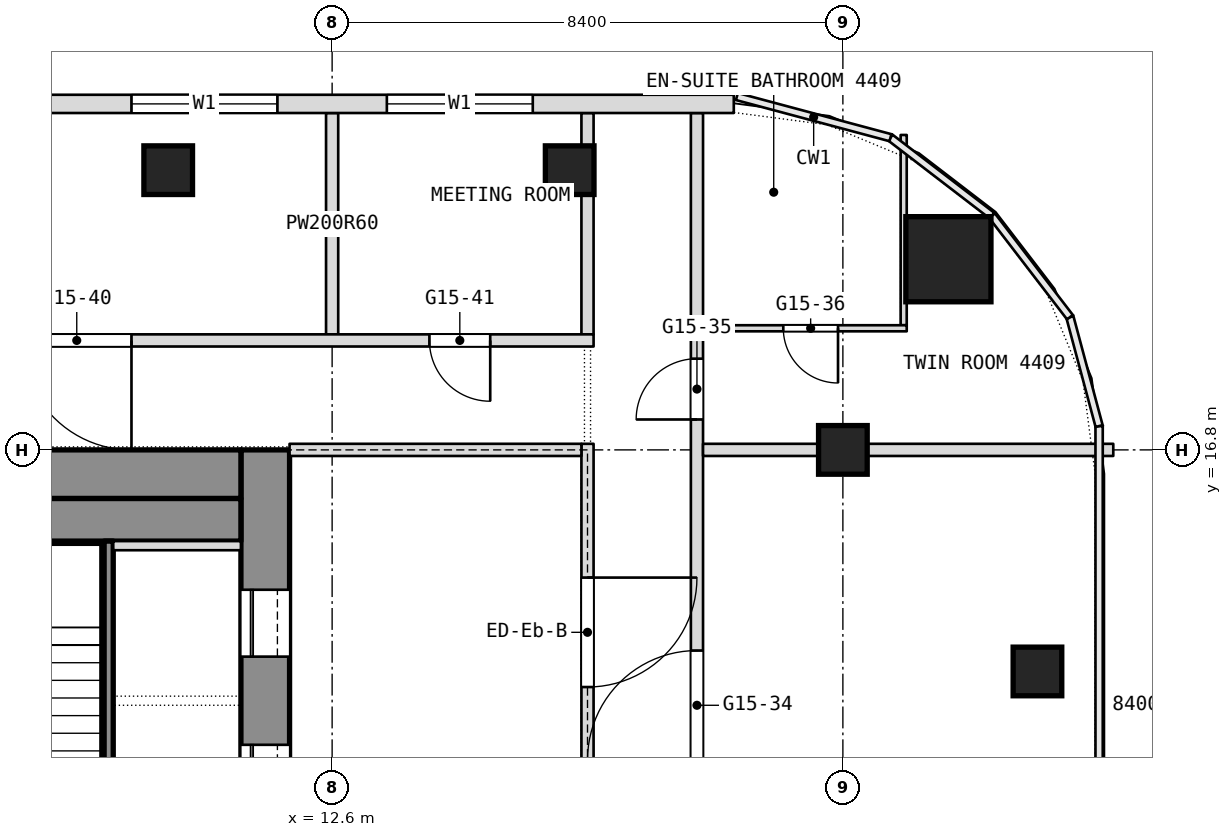
"""IFC4 building model, lengths in metres.
Left out: names, types, materials, properties, quantities, classifications, styles, units other than length and angle.
Written with IfcOpenShell. Run it as: python <this file> out.ifc"""

import sys

from ifc_helpers import new_model, si_unit, direction, frame, frame_2d, origin, origin_2d, place, context, subcontext, project, spatial, rectangle, extrude, element, fill, save


model = new_model("IFC4")
c1 = context("Model", 3, precision=1e-05, world=origin(), true_north=direction((0.0, 1.0)))
c2 = subcontext(c1, "Body", "Model", "MODEL_VIEW")
j1 = project(units=[si_unit("LENGTHUNIT", "METRE"), si_unit("PLANEANGLEUNIT", "RADIAN")], contexts=[c1])
p1 = place(None, origin())
s1 = spatial("IfcSite", under=j1, at=p1, CompositionType="ELEMENT")
p2 = place(p1, origin())
s2 = spatial("IfcBuilding", under=s1, at=p2, CompositionType="ELEMENT")
p3 = place(p2, frame((0.0, 0.0, 194.9)))
s3 = spatial("IfcBuildingStorey", under=s2, at=p3, CompositionType="ELEMENT", Elevation=194.9)
p4 = place(p3, frame((11.5, 0.0, 0.0), z_axis=(0.0, 0.0, 1.0), x_axis=(0.0, 1.0, 0.0)))
e1 = element("IfcWall", 1, at=p4, inside=s3, PredefinedType="SHEAR", context=c2, shape_type="SweptSolid", body=[
    extrude(rectangle(XDim=16.8, YDim=0.8, at=frame_2d((8.4, 0.0))), origin(), (0.0, 0.0, 1.0), 3.6),
])
p5 = place(p4, frame((2.3, 0.0, 0.0)))
e2 = element("IfcOpeningElement", 2, at=p5, cuts=e1, PredefinedType="OPENING", context=c2, shape_type="SweptSolid", body=[
    extrude(rectangle(XDim=1.1, YDim=2.1, at=frame_2d((0.55, 1.05))), frame((0.0, 0.4, 0.0), z_axis=(0.0, -1.0, 0.0), x_axis=(1.0, 0.0, 0.0)), (0.0, 0.0, 1.0), 0.8),
])
p6 = place(p4, frame((4.85, 0.0, 0.0)))
e3 = element("IfcOpeningElement", 3, at=p6, cuts=e1, PredefinedType="OPENING", context=c2, shape_type="SweptSolid", body=[
    extrude(rectangle(XDim=1.1, YDim=2.1, at=frame_2d((0.55, 1.05))), frame((0.0, 0.4, 0.0), z_axis=(0.0, -1.0, 0.0), x_axis=(1.0, 0.0, 0.0)), (0.0, 0.0, 1.0), 0.8),
])
p7 = place(p4, frame((6.825, 0.0, 0.0)))
e4 = element("IfcOpeningElement", 4, at=p7, cuts=e1, PredefinedType="OPENING", context=c2, shape_type="SweptSolid", body=[
    extrude(rectangle(XDim=1.2, YDim=2.1, at=frame_2d((0.6, 1.05))), frame((0.0, 0.4, 0.0), z_axis=(0.0, -1.0, 0.0), x_axis=(1.0, 0.0, 0.0)), (0.0, 0.0, 1.0), 0.8),
])
p8 = place(p4, frame((13.4, 0.0, 0.0)))
e5 = element("IfcOpeningElement", 5, at=p8, cuts=e1, PredefinedType="OPENING", context=c2, shape_type="SweptSolid", body=[
    extrude(rectangle(XDim=1.1, YDim=2.1, at=frame_2d((0.55, 1.05))), frame((0.0, 0.4, 0.0), z_axis=(0.0, -1.0, 0.0), x_axis=(1.0, 0.0, 0.0)), (0.0, 0.0, 1.0), 0.8),
])
p9 = place(p4, frame((10.85, 0.0, 0.0)))
e6 = element("IfcOpeningElement", 6, at=p9, cuts=e1, PredefinedType="OPENING", context=c2, shape_type="SweptSolid", body=[
    extrude(rectangle(XDim=1.1, YDim=2.1, at=frame_2d((0.55, 1.05))), frame((0.0, 0.4, 0.0), z_axis=(0.0, -1.0, 0.0), x_axis=(1.0, 0.0, 0.0)), (0.0, 0.0, 1.0), 0.8),
])
p10 = place(p4, frame((8.775, 0.0, 0.0)))
e7 = element("IfcOpeningElement", 7, at=p10, cuts=e1, PredefinedType="OPENING", context=c2, shape_type="SweptSolid", body=[
    extrude(rectangle(XDim=1.2, YDim=2.1, at=frame_2d((0.6, 1.05))), frame((0.0, 0.4, 0.0), z_axis=(0.0, -1.0, 0.0), x_axis=(1.0, 0.0, 0.0)), (0.0, 0.0, 1.0), 0.8),
])
p11 = place(p3, frame((-11.1, 16.4, 0.0), z_axis=(0.0, 0.0, 1.0), x_axis=(1.0, 0.0, 0.0)))
e8 = element("IfcWall", 8, at=p11, inside=s3, PredefinedType="SHEAR", context=c2, shape_type="SweptSolid", body=[
    extrude(rectangle(XDim=22.2, YDim=0.8, at=frame_2d((11.1, 0.0))), origin(), (0.0, 0.0, 1.0), 3.6),
])
p12 = place(p3, frame((22.736, 19.936, 0.0), z_axis=(0.0, 0.0, 1.0), x_axis=(1.0, 0.0, 0.0)))
e9 = element("IfcColumn", 9, at=p12, inside=s3, PredefinedType="COLUMN", context=c2, shape_type="SweptSolid", body=[
    extrude(rectangle(XDim=1.4, YDim=1.4, at=origin_2d()), origin(), (0.0, 0.0, 1.0), 3.6),
])
for number, where, z_axis, x_axis in (
    (10, (21.0, 16.8, 0.0), (0.0, 0.0, 1.0), (1.0, 0.0, 0.0)),
    (11, (9.904, 21.4, 0.0), (0.0, 0.0, 1.0), (1.0, 0.0, 0.0)),
    (12, (16.507, 21.4, 0.0), (0.0, 0.0, 1.0), (1.0, 0.0, 0.0)),
    (13, (24.2, 13.156, 0.0), (0.0, 0.0, 1.0), (1.0, 0.0, 0.0)),
):
    element("IfcColumn", number, at=place(p3, frame(where, z_axis=z_axis, x_axis=x_axis)), inside=s3, PredefinedType="COLUMN", context=c2, shape_type="SweptSolid", body=[
        extrude(rectangle(XDim=0.8, YDim=0.8, at=origin_2d()), origin(), (0.0, 0.0, 1.0), 3.6),
    ])
p13 = place(p3, frame((22.0, 18.85, 0.0), z_axis=(0.0, 0.0, 1.0), x_axis=(0.0, 1.0, 0.0)))
e14 = element("IfcWall", 14, at=p13, inside=s3, PredefinedType="PARTITIONING", context=c2, shape_type="SweptSolid", body=[
    extrude(rectangle(XDim=3.129, YDim=0.1, at=frame_2d((1.564, 0.0))), origin(), (0.0, 0.0, 1.0), 3.34),
])
p14 = place(p3, frame((18.6, -26.751, 0.0), z_axis=(0.0, 0.0, 1.0), x_axis=(0.0, 1.0, 0.0)))
e15 = element("IfcWall", 15, at=p14, inside=s3, PredefinedType="PARTITIONING", context=c2, shape_type="SweptSolid", body=[
    extrude(rectangle(XDim=49.091, YDim=0.2, at=frame_2d((24.545, 0.0))), origin(), (0.0, 0.0, 1.0), 3.34),
])
p15 = place(p14, frame((3.413, 0.0, 0.0)))
e16 = element("IfcOpeningElement", 16, at=p15, cuts=e15, PredefinedType="OPENING", context=c2, shape_type="SweptSolid", body=[
    extrude(rectangle(XDim=1.0, YDim=2.1, at=frame_2d((0.5, 1.05))), frame((0.0, 0.1, 0.0), z_axis=(0.0, -1.0, 0.0), x_axis=(1.0, 0.0, 0.0)), (0.0, 0.0, 1.0), 0.2),
])
p16 = place(p14, frame((5.838, 0.0, 0.0)))
e17 = element("IfcOpeningElement", 17, at=p16, cuts=e15, PredefinedType="OPENING", context=c2, shape_type="SweptSolid", body=[
    extrude(rectangle(XDim=1.0, YDim=2.1, at=frame_2d((0.5, 1.05))), frame((0.0, 0.1, 0.0), z_axis=(0.0, -1.0, 0.0), x_axis=(1.0, 0.0, 0.0)), (0.0, 0.0, 1.0), 0.2),
])
p17 = place(p14, frame((10.351, 0.0, 0.0)))
e18 = element("IfcOpeningElement", 18, at=p17, cuts=e15, PredefinedType="OPENING", context=c2, shape_type="SweptSolid", body=[
    extrude(rectangle(XDim=1.0, YDim=2.1, at=frame_2d((0.5, 1.05))), frame((0.0, 0.1, 0.0), z_axis=(0.0, -1.0, 0.0), x_axis=(1.0, 0.0, 0.0)), (0.0, 0.0, 1.0), 0.2),
])
p18 = place(p14, frame((16.951, 0.0, 0.0)))
e19 = element("IfcOpeningElement", 19, at=p18, cuts=e15, PredefinedType="OPENING", context=c2, shape_type="SweptSolid", body=[
    extrude(rectangle(XDim=1.0, YDim=2.1, at=frame_2d((0.5, 1.05))), frame((0.0, 0.1, 0.0), z_axis=(0.0, -1.0, 0.0), x_axis=(1.0, 0.0, 0.0)), (0.0, 0.0, 1.0), 0.2),
])
p19 = place(p14, frame((21.151, 0.0, 0.0)))
e20 = element("IfcOpeningElement", 20, at=p19, cuts=e15, PredefinedType="OPENING", context=c2, shape_type="SweptSolid", body=[
    extrude(rectangle(XDim=1.0, YDim=2.1, at=frame_2d((0.5, 1.05))), frame((0.0, 0.1, 0.0), z_axis=(0.0, -1.0, 0.0), x_axis=(1.0, 0.0, 0.0)), (0.0, 0.0, 1.0), 0.2),
])
p20 = place(p14, frame((22.951, 0.0, 0.0)))
e21 = element("IfcOpeningElement", 21, at=p20, cuts=e15, PredefinedType="OPENING", context=c2, shape_type="SweptSolid", body=[
    extrude(rectangle(XDim=1.0, YDim=2.1, at=frame_2d((0.5, 1.05))), frame((0.0, 0.1, 0.0), z_axis=(0.0, -1.0, 0.0), x_axis=(1.0, 0.0, 0.0)), (0.0, 0.0, 1.0), 0.2),
])
p21 = place(p14, frame((27.151, 0.0, 0.0)))
e22 = element("IfcOpeningElement", 22, at=p21, cuts=e15, PredefinedType="OPENING", context=c2, shape_type="SweptSolid", body=[
    extrude(rectangle(XDim=1.0, YDim=2.1, at=frame_2d((0.5, 1.05))), frame((0.0, 0.1, 0.0), z_axis=(0.0, -1.0, 0.0), x_axis=(1.0, 0.0, 0.0)), (0.0, 0.0, 1.0), 0.2),
])
p22 = place(p14, frame((33.751, 0.0, 0.0)))
e23 = element("IfcOpeningElement", 23, at=p22, cuts=e15, PredefinedType="OPENING", context=c2, shape_type="SweptSolid", body=[
    extrude(rectangle(XDim=1.0, YDim=2.1, at=frame_2d((0.5, 1.05))), frame((0.0, 0.1, 0.0), z_axis=(0.0, -1.0, 0.0), x_axis=(1.0, 0.0, 0.0)), (0.0, 0.0, 1.0), 0.2),
])
p23 = place(p14, frame((38.451, 0.0, 0.0)))
e24 = element("IfcOpeningElement", 24, at=p23, cuts=e15, PredefinedType="OPENING", context=c2, shape_type="SweptSolid", body=[
    extrude(rectangle(XDim=1.8, YDim=2.1, at=frame_2d((0.9, 1.05))), frame((0.0, 0.1, 0.0), z_axis=(0.0, -1.0, 0.0), x_axis=(1.0, 0.0, 0.0)), (0.0, 0.0, 1.0), 0.2),
])
p24 = place(p14, frame((44.051, 0.0, 0.0)))
e25 = element("IfcOpeningElement", 25, at=p24, cuts=e15, PredefinedType="OPENING", context=c2, shape_type="SweptSolid", body=[
    extrude(rectangle(XDim=1.0, YDim=2.1, at=frame_2d((0.5, 1.05))), frame((0.0, 0.1, 0.0), z_axis=(0.0, -1.0, 0.0), x_axis=(1.0, 0.0, 0.0)), (0.0, 0.0, 1.0), 0.2),
])
for number, where, z_axis, x_axis in (
    (26, (16.8, 18.7, 0.0), (0.0, 0.0, 1.0), (0.0, 1.0, 0.0)),
    (27, (12.6, 18.7, 0.0), (0.0, 0.0, 1.0), (0.0, 1.0, 0.0)),
):
    element("IfcWall", number, at=place(p3, frame(where, z_axis=z_axis, x_axis=x_axis)), inside=s3, PredefinedType="PARTITIONING", context=c2, shape_type="SweptSolid", body=[
        extrude(rectangle(XDim=3.64, YDim=0.2, at=frame_2d((1.82, 0.0))), origin(), (0.0, 0.0, 1.0), 3.34),
    ])
p25 = place(p3, frame((18.7, 16.8, 0.0), z_axis=(0.0, 0.0, 1.0), x_axis=(1.0, 0.0, 0.0)))
e28 = element("IfcWall", 28, at=p25, inside=s3, PredefinedType="PARTITIONING", context=c2, shape_type="SweptSolid", body=[
    extrude(rectangle(XDim=6.747, YDim=0.2, at=frame_2d((3.374, 0.0))), origin(), (0.0, 0.0, 1.0), 2.94),
])
p26 = place(p3, frame((-16.9, 18.6, 0.0), z_axis=(0.0, 0.0, 1.0), x_axis=(1.0, 0.0, 0.0)))
e29 = element("IfcWall", 29, at=p26, inside=s3, PredefinedType="PARTITIONING", context=c2, shape_type="SweptSolid", body=[
    extrude(rectangle(XDim=33.8, YDim=0.2, at=frame_2d((16.9, 0.0))), origin(), (0.0, 0.0, 1.0), 3.34),
])
p27 = place(p26, frame((1.7, 0.0, 0.0)))
e30 = element("IfcOpeningElement", 30, at=p27, cuts=e29, PredefinedType="OPENING", context=c2, shape_type="SweptSolid", body=[
    extrude(rectangle(XDim=1.0, YDim=2.1, at=frame_2d((0.5, 1.05))), frame((0.0, 0.1, 0.0), z_axis=(0.0, -1.0, 0.0), x_axis=(1.0, 0.0, 0.0)), (0.0, 0.0, 1.0), 0.2),
])
p28 = place(p26, frame((7.6, 0.0, 0.0)))
e31 = element("IfcOpeningElement", 31, at=p28, cuts=e29, PredefinedType="OPENING", context=c2, shape_type="SweptSolid", body=[
    extrude(rectangle(XDim=1.8, YDim=2.1, at=frame_2d((0.9, 1.05))), frame((0.0, 0.1, 0.0), z_axis=(0.0, -1.0, 0.0), x_axis=(1.0, 0.0, 0.0)), (0.0, 0.0, 1.0), 0.2),
])
p29 = place(p26, frame((16.0, 0.0, 0.0)))
e32 = element("IfcOpeningElement", 32, at=p29, cuts=e29, PredefinedType="OPENING", context=c2, shape_type="SweptSolid", body=[
    extrude(rectangle(XDim=1.8, YDim=2.1, at=frame_2d((0.9, 1.05))), frame((0.0, 0.1, 0.0), z_axis=(0.0, -1.0, 0.0), x_axis=(1.0, 0.0, 0.0)), (0.0, 0.0, 1.0), 0.2),
])
p30 = place(p26, frame((24.4, 0.0, 0.0)))
e33 = element("IfcOpeningElement", 33, at=p30, cuts=e29, PredefinedType="OPENING", context=c2, shape_type="SweptSolid", body=[
    extrude(rectangle(XDim=1.8, YDim=2.1, at=frame_2d((0.9, 1.05))), frame((0.0, 0.1, 0.0), z_axis=(0.0, -1.0, 0.0), x_axis=(1.0, 0.0, 0.0)), (0.0, 0.0, 1.0), 0.2),
])
p31 = place(p26, frame((31.1, 0.0, 0.0)))
e34 = element("IfcOpeningElement", 34, at=p31, cuts=e29, PredefinedType="OPENING", context=c2, shape_type="SweptSolid", body=[
    extrude(rectangle(XDim=1.0, YDim=2.1, at=frame_2d((0.5, 1.05))), frame((0.0, 0.1, 0.0), z_axis=(0.0, -1.0, 0.0), x_axis=(1.0, 0.0, 0.0)), (0.0, 0.0, 1.0), 0.2),
])
p32 = place(p3, frame((18.7, 18.8, 0.0), z_axis=(0.0, 0.0, 1.0), x_axis=(1.0, 0.0, 0.0)))
e35 = element("IfcWall", 35, at=p32, inside=s3, PredefinedType="PARTITIONING", context=c2, shape_type="SweptSolid", body=[
    extrude(rectangle(XDim=3.35, YDim=0.1, at=frame_2d((1.675, 0.0))), origin(), (0.0, 0.0, 1.0), 3.34),
])
p33 = place(p32, frame((1.32, 0.0, 0.0)))
e36 = element("IfcOpeningElement", 36, at=p33, cuts=e35, PredefinedType="OPENING", context=c2, shape_type="SweptSolid", body=[
    extrude(rectangle(XDim=0.9, YDim=2.1, at=frame_2d((0.45, 1.05))), frame((0.0, 0.05, 0.0), z_axis=(0.0, -1.0, 0.0), x_axis=(1.0, 0.0, 0.0)), (0.0, 0.0, 1.0), 0.1),
])
p34 = place(p3, frame((19.206, 22.49, 0.0), z_axis=(0.0, 0.0, 1.0), x_axis=(-1.0, 0.0, 0.0)))
e37 = element("IfcWall", 37, at=p34, inside=s3, PredefinedType="NOTDEFINED", context=c2, shape_type="SweptSolid", body=[
    extrude(rectangle(XDim=38.412, YDim=0.3, at=frame_2d((19.206, 0.0))), origin(), (0.0, 0.0, 1.0), 3.6),
])
p35 = place(p34, frame((3.306, 0.0, 0.9)))
e38 = element("IfcOpeningElement", 38, at=p35, cuts=e37, PredefinedType="OPENING", context=c2, shape_type="SweptSolid", body=[
    extrude(rectangle(XDim=2.4, YDim=2.1, at=frame_2d((1.2, 1.05))), frame((0.0, 0.15, 0.0), z_axis=(0.0, -1.0, 0.0), x_axis=(1.0, 0.0, 0.0)), (0.0, 0.0, 1.0), 0.3),
])
p36 = place(p34, frame((7.506, 0.0, 0.9)))
e39 = element("IfcOpeningElement", 39, at=p36, cuts=e37, PredefinedType="OPENING", context=c2, shape_type="SweptSolid", body=[
    extrude(rectangle(XDim=2.4, YDim=2.1, at=frame_2d((1.2, 1.05))), frame((0.0, 0.15, 0.0), z_axis=(0.0, -1.0, 0.0), x_axis=(1.0, 0.0, 0.0)), (0.0, 0.0, 1.0), 0.3),
])
p37 = place(p34, frame((11.706, 0.0, 0.9)))
e40 = element("IfcOpeningElement", 40, at=p37, cuts=e37, PredefinedType="OPENING", context=c2, shape_type="SweptSolid", body=[
    extrude(rectangle(XDim=2.4, YDim=2.1, at=frame_2d((1.2, 1.05))), frame((0.0, 0.15, 0.0), z_axis=(0.0, -1.0, 0.0), x_axis=(1.0, 0.0, 0.0)), (0.0, 0.0, 1.0), 0.3),
])
p38 = place(p34, frame((15.906, 0.0, 0.9)))
e41 = element("IfcOpeningElement", 41, at=p38, cuts=e37, PredefinedType="OPENING", context=c2, shape_type="SweptSolid", body=[
    extrude(rectangle(XDim=2.4, YDim=2.1, at=frame_2d((1.2, 1.05))), frame((0.0, 0.15, 0.0), z_axis=(0.0, -1.0, 0.0), x_axis=(1.0, 0.0, 0.0)), (0.0, 0.0, 1.0), 0.3),
])
p39 = place(p34, frame((20.106, 0.0, 0.9)))
e42 = element("IfcOpeningElement", 42, at=p39, cuts=e37, PredefinedType="OPENING", context=c2, shape_type="SweptSolid", body=[
    extrude(rectangle(XDim=2.4, YDim=2.1, at=frame_2d((1.2, 1.05))), frame((0.0, 0.15, 0.0), z_axis=(0.0, -1.0, 0.0), x_axis=(1.0, 0.0, 0.0)), (0.0, 0.0, 1.0), 0.3),
])
p40 = place(p34, frame((24.306, 0.0, 0.9)))
e43 = element("IfcOpeningElement", 43, at=p40, cuts=e37, PredefinedType="OPENING", context=c2, shape_type="SweptSolid", body=[
    extrude(rectangle(XDim=2.4, YDim=2.1, at=frame_2d((1.2, 1.05))), frame((0.0, 0.15, 0.0), z_axis=(0.0, -1.0, 0.0), x_axis=(1.0, 0.0, 0.0)), (0.0, 0.0, 1.0), 0.3),
])
p41 = place(p34, frame((28.506, 0.0, 0.9)))
e44 = element("IfcOpeningElement", 44, at=p41, cuts=e37, PredefinedType="OPENING", context=c2, shape_type="SweptSolid", body=[
    extrude(rectangle(XDim=2.4, YDim=2.1, at=frame_2d((1.2, 1.05))), frame((0.0, 0.15, 0.0), z_axis=(0.0, -1.0, 0.0), x_axis=(1.0, 0.0, 0.0)), (0.0, 0.0, 1.0), 0.3),
])
p42 = place(p34, frame((32.706, 0.0, 0.9)))
e45 = element("IfcOpeningElement", 45, at=p42, cuts=e37, PredefinedType="OPENING", context=c2, shape_type="SweptSolid", body=[
    extrude(rectangle(XDim=2.4, YDim=2.1, at=frame_2d((1.2, 1.05))), frame((0.0, 0.15, 0.0), z_axis=(0.0, -1.0, 0.0), x_axis=(1.0, 0.0, 0.0)), (0.0, 0.0, 1.0), 0.3),
])
p43 = place(p3, frame((-11.1, 15.65, 0.0), z_axis=(0.0, 0.0, 1.0), x_axis=(1.0, 0.0, 0.0)))
e46 = element("IfcWall", 46, at=p43, inside=s3, PredefinedType="PARTITIONING", context=c2, shape_type="SweptSolid", body=[
    extrude(rectangle(XDim=22.2, YDim=0.7, at=frame_2d((11.1, 0.0))), origin(), (0.0, 0.0, 1.0), 3.34),
])
p44 = place(p3, frame((8.925, 8.7, 0.0), z_axis=(0.0, 0.0, 1.0), x_axis=(0.0, 1.0, 0.0)))
e47 = element("IfcWall", 47, at=p44, inside=s3, PredefinedType="SHEAR", context=c2, shape_type="SweptSolid", body=[
    extrude(rectangle(XDim=6.6, YDim=0.15, at=frame_2d((3.3, 0.0))), origin(), (0.0, 0.0, 1.0), 3.34),
])
p45 = place(p44, frame((0.075, 0.0, 0.0)))
e48 = element("IfcOpeningElement", 48, at=p45, cuts=e47, PredefinedType="OPENING", context=c2, shape_type="SweptSolid", body=[
    extrude(rectangle(XDim=1.2, YDim=2.1, at=frame_2d((0.6, 1.05))), frame((0.0, 0.075, 0.0), z_axis=(0.0, -1.0, 0.0), x_axis=(1.0, 0.0, 0.0)), (0.0, 0.0, 1.0), 0.15),
])
p46 = place(p3, frame((9.0, 15.225, 0.0), z_axis=(0.0, 0.0, 1.0), x_axis=(1.0, 0.0, 0.0)))
e49 = element("IfcWall", 49, at=p46, inside=s3, PredefinedType="SHEAR", context=c2, shape_type="SweptSolid", body=[
    extrude(rectangle(XDim=2.1, YDim=0.15, at=frame_2d((1.05, 0.0))), origin(), (0.0, 0.0, 1.0), 3.6),
])
p47 = place(p3, frame((16.8, -0.1, 0.0), z_axis=(0.0, 0.0, 1.0), x_axis=(0.0, 1.0, 0.0)))
e50 = element("IfcWall", 50, at=p47, inside=s3, PredefinedType="PARTITIONING", context=c2, shape_type="SweptSolid", body=[
    extrude(rectangle(XDim=17.0, YDim=0.2, at=frame_2d((8.5, 0.0))), origin(), (0.0, 0.0, 1.0), 3.34),
])
p48 = place(p47, frame((2.2, 0.0, 0.0)))
e51 = element("IfcOpeningElement", 51, at=p48, cuts=e50, PredefinedType="OPENING", context=c2, shape_type="SweptSolid", body=[
    extrude(rectangle(XDim=1.8, YDim=2.1, at=frame_2d((0.9, 1.05))), frame((0.0, 0.1, 0.0), z_axis=(0.0, -1.0, 0.0), x_axis=(1.0, 0.0, 0.0)), (0.0, 0.0, 1.0), 0.2),
])
p49 = place(p47, frame((13.0, 0.0, 0.0)))
e52 = element("IfcOpeningElement", 52, at=p49, cuts=e50, PredefinedType="OPENING", context=c2, shape_type="SweptSolid", body=[
    extrude(rectangle(XDim=1.8, YDim=2.1, at=frame_2d((0.9, 1.05))), frame((0.0, 0.1, 0.0), z_axis=(0.0, -1.0, 0.0), x_axis=(1.0, 0.0, 0.0)), (0.0, 0.0, 1.0), 0.2),
])
p50 = place(p3, frame((11.9, 16.8, 0.0), z_axis=(0.0, 0.0, 1.0), x_axis=(1.0, 0.0, 0.0)))
e53 = element("IfcWall", 53, at=p50, inside=s3, PredefinedType="PARTITIONING", context=c2, shape_type="SweptSolid", body=[
    extrude(rectangle(XDim=4.8, YDim=0.2, at=frame_2d((2.4, 0.0))), origin(), (0.0, 0.0, 1.0), 2.94),
])
p51 = place(p23, origin())
e54 = element("IfcDoor", 54, at=p51, inside=s3, OperationType="DOUBLE_DOOR_SINGLE_SWING", PredefinedType="DOOR", context=c2, shape_type="SweptSolid", body=[
    extrude(rectangle(XDim=1.8, YDim=2.1, at=frame_2d((0.9, 1.05))), frame((0.0, 0.025, 0.0), z_axis=(0.0, -1.0, 0.0), x_axis=(1.0, 0.0, 0.0)), (0.0, 0.0, 1.0), 0.05),
])
fill(e24, e54)
p52 = place(p24, origin())
e55 = element("IfcDoor", 55, at=p52, inside=s3, OperationType="SINGLE_SWING_LEFT", PredefinedType="DOOR", context=c2, shape_type="SweptSolid", body=[
    extrude(rectangle(XDim=1.0, YDim=2.1, at=frame_2d((0.5, 1.05))), frame((0.0, 0.025, 0.0), z_axis=(0.0, -1.0, 0.0), x_axis=(1.0, 0.0, 0.0)), (0.0, 0.0, 1.0), 0.05),
])
fill(e25, e55)
p53 = place(p30, origin())
e56 = element("IfcDoor", 56, at=p53, inside=s3, OperationType="DOUBLE_DOOR_SINGLE_SWING", PredefinedType="DOOR", context=c2, shape_type="SweptSolid", body=[
    extrude(rectangle(XDim=1.8, YDim=2.1, at=frame_2d((0.9, 1.05))), frame((0.0, 0.025, 0.0), z_axis=(0.0, -1.0, 0.0), x_axis=(1.0, 0.0, 0.0)), (0.0, 0.0, 1.0), 0.05),
])
fill(e33, e56)
p54 = place(p31, origin())
e57 = element("IfcDoor", 57, at=p54, inside=s3, OperationType="SINGLE_SWING_LEFT", PredefinedType="DOOR", context=c2, shape_type="SweptSolid", body=[
    extrude(rectangle(XDim=1.0, YDim=2.1, at=frame_2d((0.5, 1.05))), frame((0.0, 0.025, 0.0), z_axis=(0.0, -1.0, 0.0), x_axis=(1.0, 0.0, 0.0)), (0.0, 0.0, 1.0), 0.05),
])
fill(e34, e57)
p55 = place(p33, origin())
e58 = element("IfcDoor", 58, at=p55, inside=s3, OperationType="SINGLE_SWING_RIGHT", PredefinedType="DOOR", context=c2, shape_type="SweptSolid", body=[
    extrude(rectangle(XDim=0.9, YDim=2.1, at=frame_2d((0.45, 1.05))), frame((0.0, 0.025, 0.0), z_axis=(0.0, -1.0, 0.0), x_axis=(1.0, 0.0, 0.0)), (0.0, 0.0, 1.0), 0.05),
])
fill(e36, e58)
p56 = place(p35, origin())
e59 = element("IfcWindow", 59, at=p56, inside=s3, PartitioningType="SINGLE_PANEL", PredefinedType="WINDOW", context=c2, shape_type="SweptSolid", body=[
    extrude(rectangle(XDim=2.4, YDim=2.1, at=frame_2d((1.2, 1.05))), frame((0.0, 0.03, 0.0), z_axis=(0.0, -1.0, 0.0), x_axis=(1.0, 0.0, 0.0)), (0.0, 0.0, 1.0), 0.06),
])
fill(e38, e59)
p57 = place(p36, origin())
e60 = element("IfcWindow", 60, at=p57, inside=s3, PartitioningType="SINGLE_PANEL", PredefinedType="WINDOW", context=c2, shape_type="SweptSolid", body=[
    extrude(rectangle(XDim=2.4, YDim=2.1, at=frame_2d((1.2, 1.05))), frame((0.0, 0.03, 0.0), z_axis=(0.0, -1.0, 0.0), x_axis=(1.0, 0.0, 0.0)), (0.0, 0.0, 1.0), 0.06),
])
fill(e39, e60)
p58 = place(p8, origin())
e61 = element("IfcDoor", 61, at=p58, inside=s3, OperationType="SLIDING_TO_LEFT", PredefinedType="DOOR", context=c2, shape_type="SweptSolid", body=[
    extrude(rectangle(XDim=1.1, YDim=2.1, at=frame_2d((0.55, 1.05))), frame((0.0, 0.025, 0.0), z_axis=(0.0, -1.0, 0.0), x_axis=(1.0, 0.0, 0.0)), (0.0, 0.0, 1.0), 0.05),
])
fill(e5, e61)
p59 = place(p9, origin())
e62 = element("IfcDoor", 62, at=p59, inside=s3, OperationType="SLIDING_TO_LEFT", PredefinedType="DOOR", context=c2, shape_type="SweptSolid", body=[
    extrude(rectangle(XDim=1.1, YDim=2.1, at=frame_2d((0.55, 1.05))), frame((0.0, 0.025, 0.0), z_axis=(0.0, -1.0, 0.0), x_axis=(1.0, 0.0, 0.0)), (0.0, 0.0, 1.0), 0.05),
])
fill(e6, e62)
p60 = place(p49, origin())
e63 = element("IfcDoor", 63, at=p60, inside=s3, OperationType="DOUBLE_DOOR_SINGLE_SWING", PredefinedType="DOOR", context=c2, shape_type="SweptSolid", body=[
    extrude(rectangle(XDim=1.8, YDim=2.1, at=frame_2d((0.9, 1.05))), frame((0.0, 0.025, 0.0), z_axis=(0.0, -1.0, 0.0), x_axis=(1.0, 0.0, 0.0)), (0.0, 0.0, 1.0), 0.05),
])
fill(e52, e63)
save(model, sys.argv[1])
